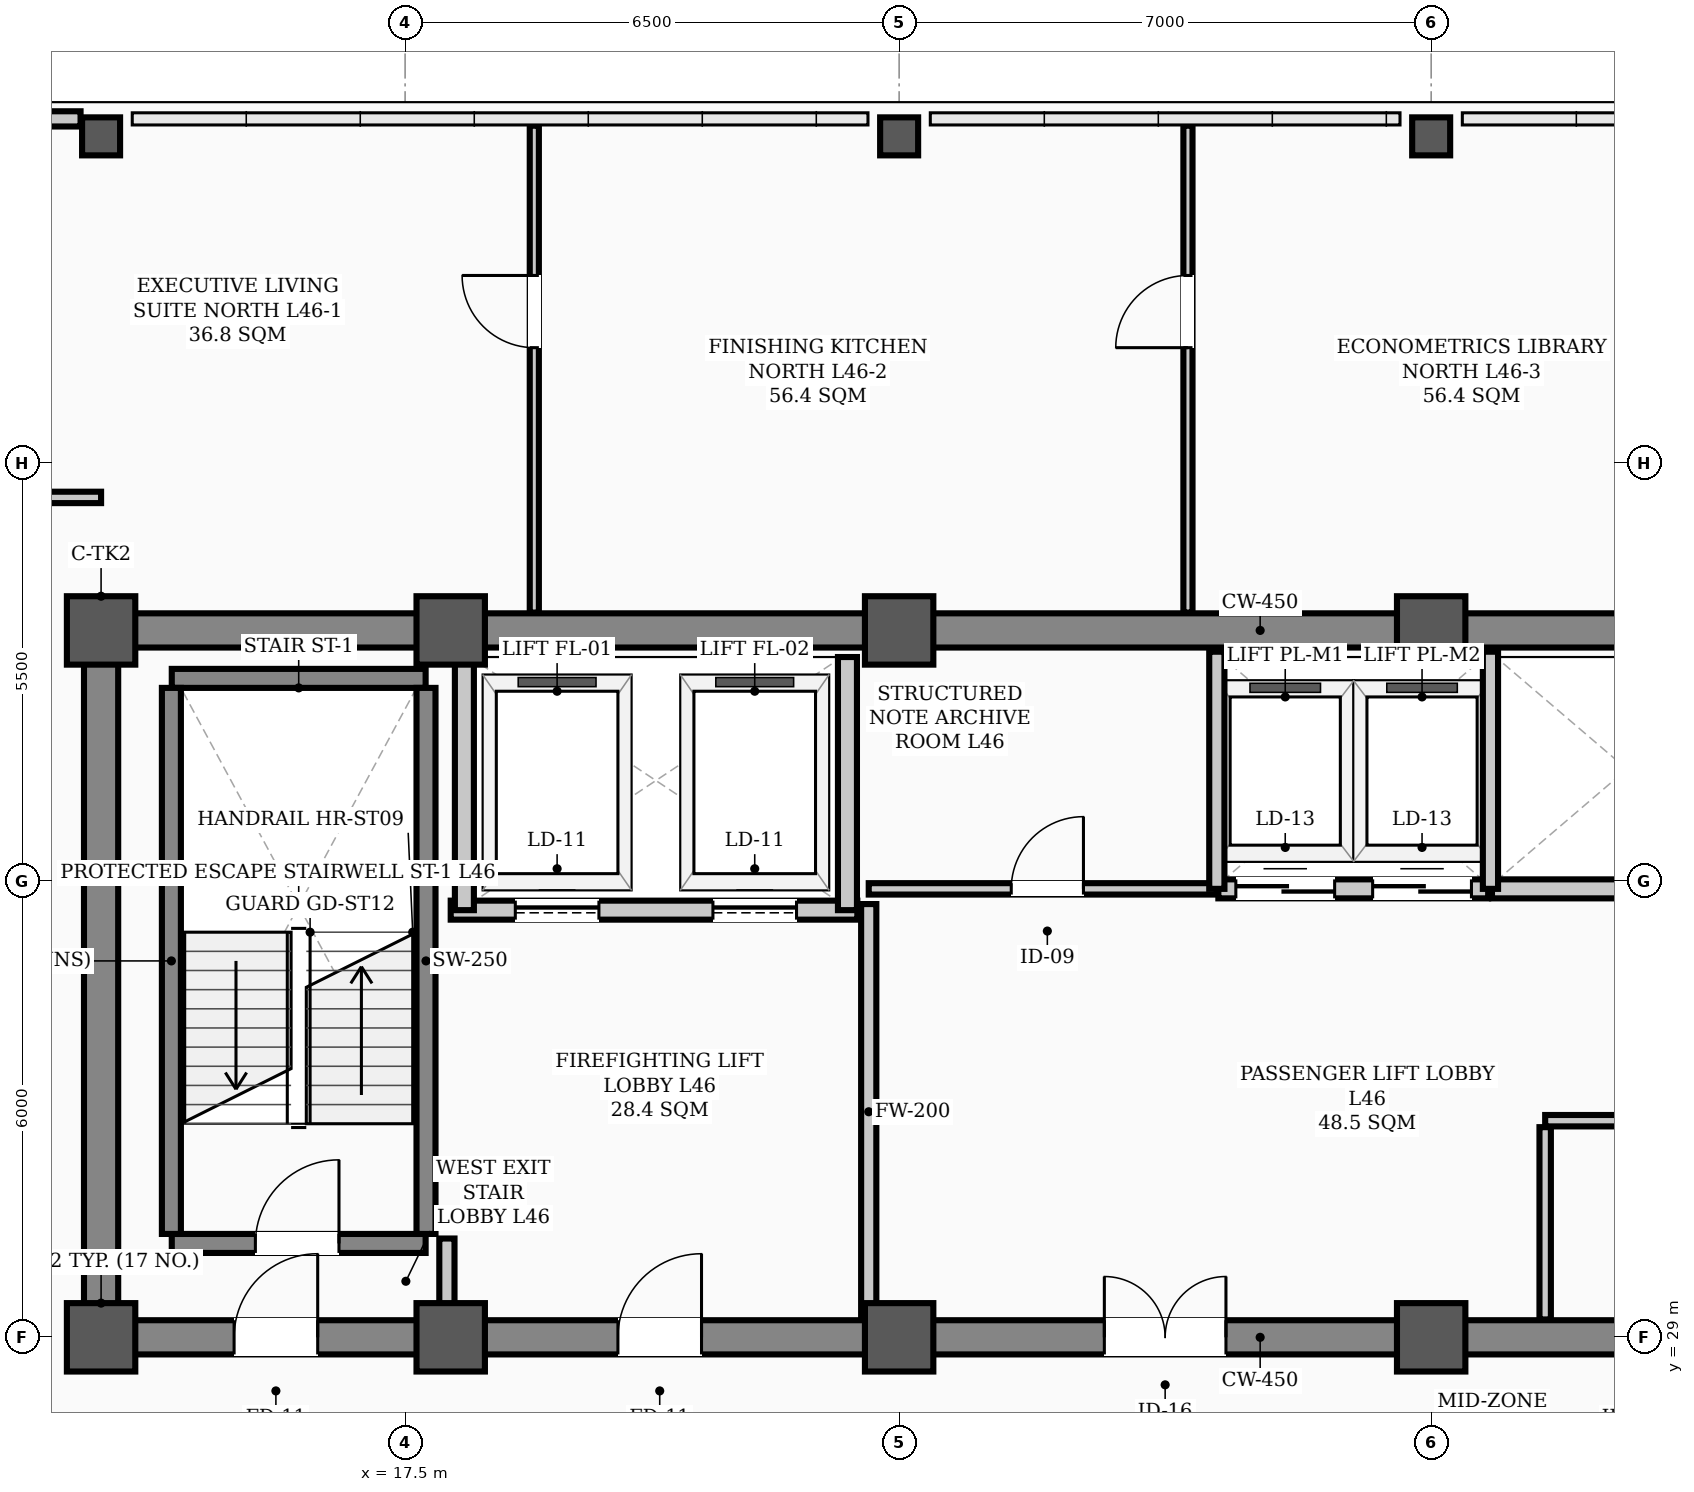
"""IFC4 building model, lengths in metres.
Left out: names, types, materials, properties, quantities, classifications, styles, units other than length and angle.
Written with IfcOpenShell. Run it as: python <this file> out.ifc"""

import sys

from ifc_helpers import new_model, si_unit, direction, frame, frame_2d, origin, origin_2d, place, context, subcontext, project, spatial, rectangle, hollow_rectangle, extrude, element, fill, save


model = new_model("IFC4")
c1 = context("Model", 3, precision=1e-05, world=origin(), true_north=direction((0.0, 1.0)))
c2 = subcontext(c1, "Body", "Model", "MODEL_VIEW")
j1 = project(units=[si_unit("LENGTHUNIT", "METRE"), si_unit("PLANEANGLEUNIT", "RADIAN")], contexts=[c1])
p1 = place(None, origin())
s1 = spatial("IfcSite", under=j1, at=p1, CompositionType="ELEMENT")
p2 = place(p1, origin())
s2 = spatial("IfcBuilding", under=s1, at=p2, CompositionType="ELEMENT")
p3 = place(p2, frame((0.0, 0.0, 185.1)))
s3 = spatial("IfcBuildingStorey", under=s2, at=p3, CompositionType="ELEMENT", Elevation=185.1)
for number, where, z_axis, x_axis in (
    (1, (13.5, 29.0, 0.0), (0.0, 0.0, 1.0), (1.0, 0.0, 0.0)),
    (2, (13.5, 38.3, 0.0), (0.0, 0.0, 1.0), (1.0, 0.0, 0.0)),
    (3, (18.1, 29.0, 0.0), (0.0, 0.0, 1.0), (1.0, 0.0, 0.0)),
    (4, (18.1, 38.3, 0.0), (0.0, 0.0, 1.0), (1.0, 0.0, 0.0)),
    (5, (24.0, 29.0, 0.0), (0.0, 0.0, 1.0), (1.0, 0.0, 0.0)),
    (6, (24.0, 38.3, 0.0), (0.0, 0.0, 1.0), (1.0, 0.0, 0.0)),
    (7, (31.0, 29.0, 0.0), (0.0, 0.0, 1.0), (1.0, 0.0, 0.0)),
    (8, (31.0, 38.3, 0.0), (0.0, 0.0, 1.0), (1.0, 0.0, 0.0)),
):
    element("IfcColumn", number, at=place(p3, frame(where, z_axis=z_axis, x_axis=x_axis)), inside=s3, PredefinedType="COLUMN", context=c2, shape_type="SweptSolid", body=[
        extrude(hollow_rectangle(XDim=0.9, YDim=0.9, WallThickness=0.035, InnerFilletRadius=0.017, OuterFilletRadius=0.052, at=origin_2d()), origin(), (0.0, 0.0, 1.0), 3.9),
    ])
for number, where, z_axis, x_axis in (
    (9, (13.5, 44.8, 0.0), (0.0, 0.0, 1.0), (1.0, 0.0, 0.0)),
    (10, (24.0, 44.8, 0.0), (0.0, 0.0, 1.0), (1.0, 0.0, 0.0)),
    (11, (31.0, 44.8, 0.0), (0.0, 0.0, 1.0), (1.0, 0.0, 0.0)),
):
    element("IfcColumn", number, at=place(p3, frame(where, z_axis=z_axis, x_axis=x_axis)), inside=s3, PredefinedType="COLUMN", context=c2, shape_type="SweptSolid", body=[
        extrude(hollow_rectangle(XDim=0.5, YDim=0.5, WallThickness=0.024, InnerFilletRadius=0.012, OuterFilletRadius=0.036, at=origin_2d()), origin(), (0.0, 0.0, 1.0), 3.9),
    ])
p4 = place(p3, frame((12.6, 45.03, 0.0), z_axis=(0.0, 0.0, 1.0), x_axis=(1.0, 0.0, 0.0)))
e12 = element("IfcWall", 12, at=p4, inside=s3, PredefinedType="PARAPET", context=c2, shape_type="SweptSolid", body=[
    extrude(rectangle(XDim=0.63, YDim=0.2, at=frame_2d((0.315, 0.0))), origin(), (0.0, 0.0, 1.0), 1.2),
])
p5 = place(p3, frame((13.5, 29.0, 0.0), z_axis=(0.0, 0.0, 1.0), x_axis=(1.0, 0.0, 0.0)))
e13 = element("IfcWall", 13, at=p5, inside=s3, PredefinedType="SHEAR", context=c2, shape_type="SweptSolid", body=[
    extrude(rectangle(XDim=30.5, YDim=0.45, at=frame_2d((15.25, 0.0))), origin(), (0.0, 0.0, 1.0), 3.72),
])
p6 = place(p5, frame((1.75, 0.0, 0.0)))
e14 = element("IfcOpeningElement", 14, at=p6, cuts=e13, PredefinedType="OPENING", context=c2, shape_type="SweptSolid", body=[
    extrude(rectangle(XDim=1.1, YDim=2.08, at=frame_2d((0.55, 1.04))), frame((0.0, 0.235, 0.0), z_axis=(0.0, -1.0, 0.0), x_axis=(1.0, 0.0, 0.0)), (0.0, 0.0, 1.0), 0.47),
])
p7 = place(p5, frame((26.7, 0.0, 0.0)))
e15 = element("IfcOpeningElement", 15, at=p7, cuts=e13, PredefinedType="OPENING", context=c2, shape_type="SweptSolid", body=[
    extrude(rectangle(XDim=1.1, YDim=2.08, at=frame_2d((0.55, 1.04))), frame((0.0, 0.235, 0.0), z_axis=(0.0, -1.0, 0.0), x_axis=(1.0, 0.0, 0.0)), (0.0, 0.0, 1.0), 0.47),
])
p8 = place(p5, frame((6.8, 0.0, 0.0)))
e16 = element("IfcOpeningElement", 16, at=p8, cuts=e13, PredefinedType="OPENING", context=c2, shape_type="SweptSolid", body=[
    extrude(rectangle(XDim=1.1, YDim=2.08, at=frame_2d((0.55, 1.04))), frame((0.0, 0.235, 0.0), z_axis=(0.0, -1.0, 0.0), x_axis=(1.0, 0.0, 0.0)), (0.0, 0.0, 1.0), 0.47),
])
p9 = place(p5, frame((13.2, 0.0, 0.0)))
e17 = element("IfcOpeningElement", 17, at=p9, cuts=e13, PredefinedType="OPENING", context=c2, shape_type="SweptSolid", body=[
    extrude(rectangle(XDim=1.6, YDim=2.08, at=frame_2d((0.8, 1.04))), frame((0.0, 0.235, 0.0), z_axis=(0.0, -1.0, 0.0), x_axis=(1.0, 0.0, 0.0)), (0.0, 0.0, 1.0), 0.47),
])
p10 = place(p5, frame((20.525, 0.0, 0.0)))
e18 = element("IfcOpeningElement", 18, at=p10, cuts=e13, PredefinedType="OPENING", context=c2, shape_type="SweptSolid", body=[
    extrude(rectangle(XDim=0.95, YDim=2.08, at=frame_2d((0.475, 1.04))), frame((0.0, 0.235, 0.0), z_axis=(0.0, -1.0, 0.0), x_axis=(1.0, 0.0, 0.0)), (0.0, 0.0, 1.0), 0.47),
])
p11 = place(p3, frame((13.5, 38.3, 0.0), z_axis=(0.0, 0.0, 1.0), x_axis=(1.0, 0.0, 0.0)))
e19 = element("IfcWall", 19, at=p11, inside=s3, PredefinedType="SHEAR", context=c2, shape_type="SweptSolid", body=[
    extrude(rectangle(XDim=30.5, YDim=0.45, at=frame_2d((15.25, 0.0))), origin(), (0.0, 0.0, 1.0), 3.72),
])
p12 = place(p3, frame((13.5, 29.35, 0.0), z_axis=(0.0, 0.0, 1.0), x_axis=(0.0, 1.0, 0.0)))
e20 = element("IfcWall", 20, at=p12, inside=s3, PredefinedType="SHEAR", context=c2, shape_type="SweptSolid", body=[
    extrude(rectangle(XDim=8.6, YDim=0.45, at=frame_2d((4.3, 0.0))), origin(), (0.0, 0.0, 1.0), 3.72),
])
p13 = place(p3, frame((14.43, 30.235, 0.0), z_axis=(0.0, 0.0, 1.0), x_axis=(1.0, 0.0, 0.0)))
e21 = element("IfcWall", 21, at=p13, inside=s3, PredefinedType="STANDARD", context=c2, shape_type="SweptSolid", body=[
    extrude(rectangle(XDim=3.34, YDim=0.25, at=frame_2d((1.67, 0.0))), origin(), (0.0, 0.0, 1.0), 3.72),
])
p14 = place(p13, frame((1.1, 0.0, 0.0)))
e22 = element("IfcOpeningElement", 22, at=p14, cuts=e21, PredefinedType="OPENING", context=c2, shape_type="SweptSolid", body=[
    extrude(rectangle(XDim=1.1, YDim=2.08, at=frame_2d((0.55, 1.04))), frame((0.0, 0.135, 0.0), z_axis=(0.0, -1.0, 0.0), x_axis=(1.0, 0.0, 0.0)), (0.0, 0.0, 1.0), 0.27),
])
p15 = place(p3, frame((14.43, 37.669, 0.0), z_axis=(0.0, 0.0, 1.0), x_axis=(1.0, 0.0, 0.0)))
e23 = element("IfcWall", 23, at=p15, inside=s3, PredefinedType="STANDARD", context=c2, shape_type="SweptSolid", body=[
    extrude(rectangle(XDim=3.34, YDim=0.25, at=frame_2d((1.67, 0.0))), origin(), (0.0, 0.0, 1.0), 3.72),
])
for number, where, z_axis, x_axis in (
    (24, (14.425, 30.36, 0.0), (0.0, 0.0, 1.0), (0.0, 1.0, 0.0)),
    (25, (17.775, 30.36, 0.0), (0.0, 0.0, 1.0), (0.0, 1.0, 0.0)),
):
    element("IfcWall", number, at=place(p3, frame(where, z_axis=z_axis, x_axis=x_axis)), inside=s3, PredefinedType="STANDARD", context=c2, shape_type="SweptSolid", body=[
        extrude(rectangle(XDim=7.184, YDim=0.25, at=frame_2d((3.592, 0.0))), origin(), (0.0, 0.0, 1.0), 3.72),
    ])
p16 = place(p3, frame((18.1, 34.62, 0.0), z_axis=(0.0, 0.0, 1.0), x_axis=(1.0, 0.0, 0.0)))
e26 = element("IfcWall", 26, at=p16, inside=s3, PredefinedType="STANDARD", context=c2, shape_type="SweptSolid", body=[
    extrude(rectangle(XDim=5.35, YDim=0.25, at=frame_2d((2.675, 0.0))), origin(), (0.0, 0.0, 1.0), 3.72),
])
p17 = place(p16, frame((0.85, 0.0, 0.0)))
e27 = element("IfcOpeningElement", 27, at=p17, cuts=e26, PredefinedType="OPENING", context=c2, shape_type="SweptSolid", body=[
    extrude(rectangle(XDim=1.1, YDim=2.08, at=frame_2d((0.55, 1.04))), frame((0.0, 0.135, 0.0), z_axis=(0.0, -1.0, 0.0), x_axis=(1.0, 0.0, 0.0)), (0.0, 0.0, 1.0), 0.27),
])
p18 = place(p16, frame((3.45, 0.0, 0.0)))
e28 = element("IfcOpeningElement", 28, at=p18, cuts=e26, PredefinedType="OPENING", context=c2, shape_type="SweptSolid", body=[
    extrude(rectangle(XDim=1.1, YDim=2.08, at=frame_2d((0.55, 1.04))), frame((0.0, 0.135, 0.0), z_axis=(0.0, -1.0, 0.0), x_axis=(1.0, 0.0, 0.0)), (0.0, 0.0, 1.0), 0.27),
])
for number, where, z_axis, x_axis in (
    (29, (18.28, 34.62, 0.0), (0.0, 0.0, 1.0), (0.0, 1.0, 0.0)),
    (30, (23.32, 34.62, 0.0), (0.0, 0.0, 1.0), (0.0, 1.0, 0.0)),
):
    element("IfcWall", number, at=place(p3, frame(where, z_axis=z_axis, x_axis=x_axis)), inside=s3, PredefinedType="STANDARD", context=c2, shape_type="SweptSolid", body=[
        extrude(rectangle(XDim=3.33, YDim=0.25, at=frame_2d((1.665, 0.0))), origin(), (0.0, 0.0, 1.0), 3.35),
    ])
p19 = place(p3, frame((28.2, 34.9, 0.0), z_axis=(0.0, 0.0, 1.0), x_axis=(1.0, 0.0, 0.0)))
e31 = element("IfcWall", 31, at=p19, inside=s3, PredefinedType="STANDARD", context=c2, shape_type="SweptSolid", body=[
    extrude(rectangle(XDim=3.55, YDim=0.25, at=frame_2d((1.775, 0.0))), origin(), (0.0, 0.0, 1.0), 3.72),
])
p20 = place(p19, frame((0.23, 0.0, 0.0)))
e32 = element("IfcOpeningElement", 32, at=p20, cuts=e31, PredefinedType="OPENING", context=c2, shape_type="SweptSolid", body=[
    extrude(rectangle(XDim=1.3, YDim=2.08, at=frame_2d((0.65, 1.04))), frame((0.0, 0.135, 0.0), z_axis=(0.0, -1.0, 0.0), x_axis=(1.0, 0.0, 0.0)), (0.0, 0.0, 1.0), 0.27),
])
p21 = place(p19, frame((2.03, 0.0, 0.0)))
e33 = element("IfcOpeningElement", 33, at=p21, cuts=e31, PredefinedType="OPENING", context=c2, shape_type="SweptSolid", body=[
    extrude(rectangle(XDim=1.3, YDim=2.08, at=frame_2d((0.65, 1.04))), frame((0.0, 0.135, 0.0), z_axis=(0.0, -1.0, 0.0), x_axis=(1.0, 0.0, 0.0)), (0.0, 0.0, 1.0), 0.27),
])
p22 = place(p3, frame((31.8, 34.9, 0.0), z_axis=(0.0, 0.0, 1.0), x_axis=(1.0, 0.0, 0.0)))
e34 = element("IfcWall", 34, at=p22, inside=s3, PredefinedType="STANDARD", context=c2, shape_type="SweptSolid", body=[
    extrude(rectangle(XDim=3.6, YDim=0.25, at=frame_2d((1.8, 0.0))), origin(), (0.0, 0.0, 1.0), 3.72),
])
p23 = place(p3, frame((23.6, 34.9, 0.0), z_axis=(0.0, 0.0, 1.0), x_axis=(1.0, 0.0, 0.0)))
e35 = element("IfcWall", 35, at=p23, inside=s3, PredefinedType="PARTITIONING", context=c2, shape_type="SweptSolid", body=[
    extrude(rectangle(XDim=4.58, YDim=0.15, at=frame_2d((2.29, 0.0))), origin(), (0.0, 0.0, 1.0), 3.72),
])
p24 = place(p23, frame((1.875, 0.0, 0.0)))
e36 = element("IfcOpeningElement", 36, at=p24, cuts=e35, PredefinedType="OPENING", context=c2, shape_type="SweptSolid", body=[
    extrude(rectangle(XDim=0.95, YDim=2.08, at=frame_2d((0.475, 1.04))), frame((0.0, 0.085, 0.0), z_axis=(0.0, -1.0, 0.0), x_axis=(1.0, 0.0, 0.0)), (0.0, 0.0, 1.0), 0.17),
])
p25 = place(p3, frame((32.5, 31.85, 0.0), z_axis=(0.0, 0.0, 1.0), x_axis=(1.0, 0.0, 0.0)))
e37 = element("IfcWall", 37, at=p25, inside=s3, PredefinedType="PARTITIONING", context=c2, shape_type="SweptSolid", body=[
    extrude(rectangle(XDim=4.1, YDim=0.15, at=frame_2d((2.05, 0.0))), origin(), (0.0, 0.0, 1.0), 3.72),
])
p26 = place(p3, frame((10.31, 40.05, 0.0), z_axis=(0.0, 0.0, 1.0), x_axis=(1.0, 0.0, 0.0)))
e38 = element("IfcWall", 38, at=p26, inside=s3, PredefinedType="PARTITIONING", context=c2, shape_type="SweptSolid", body=[
    extrude(rectangle(XDim=3.19, YDim=0.15, at=frame_2d((1.595, 0.0))), origin(), (0.0, 0.0, 1.0), 3.2),
])
p27 = place(p3, frame((18.05, 29.235, 0.0), z_axis=(0.0, 0.0, 1.0), x_axis=(0.0, 1.0, 0.0)))
e39 = element("IfcWall", 39, at=p27, inside=s3, PredefinedType="STANDARD", context=c2, shape_type="SweptSolid", body=[
    extrude(rectangle(XDim=1.065, YDim=0.2, at=frame_2d((0.532, 0.0))), origin(), (0.0, 0.0, 1.0), 3.35),
])
p28 = place(p3, frame((23.6, 29.235, 0.0), z_axis=(0.0, 0.0, 1.0), x_axis=(0.0, 1.0, 0.0)))
e40 = element("IfcWall", 40, at=p28, inside=s3, PredefinedType="STANDARD", context=c2, shape_type="SweptSolid", body=[
    extrude(rectangle(XDim=5.465, YDim=0.2, at=frame_2d((2.732, 0.0))), origin(), (0.0, 0.0, 1.0), 3.2),
])
p29 = place(p3, frame((32.5, 29.235, 0.0), z_axis=(0.0, 0.0, 1.0), x_axis=(0.0, 1.0, 0.0)))
e41 = element("IfcWall", 41, at=p29, inside=s3, PredefinedType="PARTITIONING", context=c2, shape_type="SweptSolid", body=[
    extrude(rectangle(XDim=2.53, YDim=0.15, at=frame_2d((1.265, 0.0))), origin(), (0.0, 0.0, 1.0), 3.35),
])
p30 = place(p3, frame((19.2, 38.535, 0.0), z_axis=(0.0, 0.0, 1.0), x_axis=(0.0, 1.0, 0.0)))
e42 = element("IfcWall", 42, at=p30, inside=s3, PredefinedType="PARTITIONING", context=c2, shape_type="SweptSolid", body=[
    extrude(rectangle(XDim=6.405, YDim=0.12, at=frame_2d((3.203, 0.0))), origin(), (0.0, 0.0, 1.0), 3.212),
])
p31 = place(p30, frame((3.485, 0.0, 0.0)))
e43 = element("IfcOpeningElement", 43, at=p31, cuts=e42, PredefinedType="OPENING", context=c2, shape_type="SweptSolid", body=[
    extrude(rectangle(XDim=0.95, YDim=2.08, at=frame_2d((0.475, 1.04))), frame((0.0, 0.07, 0.0), z_axis=(0.0, -1.0, 0.0), x_axis=(1.0, 0.0, 0.0)), (0.0, 0.0, 1.0), 0.14),
])
p32 = place(p3, frame((27.8, 38.535, 0.0), z_axis=(0.0, 0.0, 1.0), x_axis=(0.0, 1.0, 0.0)))
e44 = element("IfcWall", 44, at=p32, inside=s3, PredefinedType="PARTITIONING", context=c2, shape_type="SweptSolid", body=[
    extrude(rectangle(XDim=6.405, YDim=0.12, at=frame_2d((3.203, 0.0))), origin(), (0.0, 0.0, 1.0), 3.212),
])
p33 = place(p32, frame((3.485, 0.0, 0.0)))
e45 = element("IfcOpeningElement", 45, at=p33, cuts=e44, PredefinedType="OPENING", context=c2, shape_type="SweptSolid", body=[
    extrude(rectangle(XDim=0.95, YDim=2.08, at=frame_2d((0.475, 1.04))), frame((0.0, 0.07, 0.0), z_axis=(0.0, -1.0, 0.0), x_axis=(1.0, 0.0, 0.0)), (0.0, 0.0, 1.0), 0.14),
])
for number, where, z_axis, x_axis in (
    (46, (28.18, 34.9, 0.0), (0.0, 0.0, 1.0), (0.0, 1.0, 0.0)),
    (47, (31.78, 34.9, 0.0), (0.0, 0.0, 1.0), (0.0, 1.0, 0.0)),
):
    element("IfcWall", number, at=place(p3, frame(where, z_axis=z_axis, x_axis=x_axis)), inside=s3, PredefinedType="STANDARD", context=c2, shape_type="SweptSolid", body=[
        extrude(rectangle(XDim=3.12, YDim=0.2, at=frame_2d((1.56, 0.0))), origin(), (0.0, 0.0, 1.0), 3.35),
    ])
p34 = place(p14, origin())
e48 = element("IfcDoor", 48, at=p34, inside=s3, OperationType="SINGLE_SWING_RIGHT", PredefinedType="DOOR", context=c2, shape_type="SweptSolid", body=[
    extrude(rectangle(XDim=1.1, YDim=2.08, at=frame_2d((0.55, 1.04))), frame((0.0, 0.025, 0.0), z_axis=(0.0, -1.0, 0.0), x_axis=(1.0, 0.0, 0.0)), (0.0, 0.0, 1.0), 0.05),
])
fill(e22, e48)
p35 = place(p6, origin())
e49 = element("IfcDoor", 49, at=p35, inside=s3, OperationType="SINGLE_SWING_RIGHT", PredefinedType="DOOR", context=c2, shape_type="SweptSolid", body=[
    extrude(rectangle(XDim=1.1, YDim=2.08, at=frame_2d((0.55, 1.04))), frame((0.0, 0.025, 0.0), z_axis=(0.0, -1.0, 0.0), x_axis=(1.0, 0.0, 0.0)), (0.0, 0.0, 1.0), 0.05),
])
fill(e14, e49)
p36 = place(p8, origin())
e50 = element("IfcDoor", 50, at=p36, inside=s3, OperationType="SINGLE_SWING_RIGHT", PredefinedType="DOOR", context=c2, shape_type="SweptSolid", body=[
    extrude(rectangle(XDim=1.1, YDim=2.08, at=frame_2d((0.55, 1.04))), frame((0.0, 0.025, 0.0), z_axis=(0.0, -1.0, 0.0), x_axis=(1.0, 0.0, 0.0)), (0.0, 0.0, 1.0), 0.05),
])
fill(e16, e50)
p37 = place(p9, origin())
e51 = element("IfcDoor", 51, at=p37, inside=s3, OperationType="DOUBLE_DOOR_SINGLE_SWING", PredefinedType="DOOR", context=c2, shape_type="SweptSolid", body=[
    extrude(rectangle(XDim=1.6, YDim=2.08, at=frame_2d((0.8, 1.04))), frame((0.0, 0.025, 0.0), z_axis=(0.0, -1.0, 0.0), x_axis=(1.0, 0.0, 0.0)), (0.0, 0.0, 1.0), 0.05),
])
fill(e17, e51)
p38 = place(p24, origin())
e52 = element("IfcDoor", 52, at=p38, inside=s3, OperationType="SINGLE_SWING_RIGHT", PredefinedType="DOOR", context=c2, shape_type="SweptSolid", body=[
    extrude(rectangle(XDim=0.95, YDim=2.08, at=frame_2d((0.475, 1.04))), frame((0.0, 0.025, 0.0), z_axis=(0.0, -1.0, 0.0), x_axis=(1.0, 0.0, 0.0)), (0.0, 0.0, 1.0), 0.05),
])
fill(e36, e52)
p39 = place(p31, origin())
e53 = element("IfcDoor", 53, at=p39, inside=s3, OperationType="SINGLE_SWING_RIGHT", PredefinedType="DOOR", context=c2, shape_type="SweptSolid", body=[
    extrude(rectangle(XDim=0.95, YDim=2.08, at=frame_2d((0.475, 1.04))), frame((0.0, 0.025, 0.0), z_axis=(0.0, -1.0, 0.0), x_axis=(1.0, 0.0, 0.0)), (0.0, 0.0, 1.0), 0.05),
])
fill(e43, e53)
p40 = place(p33, origin())
e54 = element("IfcDoor", 54, at=p40, inside=s3, OperationType="SINGLE_SWING_LEFT", PredefinedType="DOOR", context=c2, shape_type="SweptSolid", body=[
    extrude(rectangle(XDim=0.95, YDim=2.08, at=frame_2d((0.475, 1.04))), frame((0.0, 0.025, 0.0), z_axis=(0.0, -1.0, 0.0), x_axis=(1.0, 0.0, 0.0)), (0.0, 0.0, 1.0), 0.05),
])
fill(e45, e54)
p41 = place(p17, origin())
e55 = element("IfcDoor", 55, at=p41, inside=s3, OperationType="SLIDING_TO_LEFT", PredefinedType="DOOR", context=c2, shape_type="SweptSolid", body=[
    extrude(rectangle(XDim=1.1, YDim=2.08, at=frame_2d((0.55, 1.04))), frame((0.0, 0.025, 0.0), z_axis=(0.0, -1.0, 0.0), x_axis=(1.0, 0.0, 0.0)), (0.0, 0.0, 1.0), 0.05),
])
fill(e27, e55)
p42 = place(p18, origin())
e56 = element("IfcDoor", 56, at=p42, inside=s3, OperationType="SLIDING_TO_LEFT", PredefinedType="DOOR", context=c2, shape_type="SweptSolid", body=[
    extrude(rectangle(XDim=1.1, YDim=2.08, at=frame_2d((0.55, 1.04))), frame((0.0, 0.025, 0.0), z_axis=(0.0, -1.0, 0.0), x_axis=(1.0, 0.0, 0.0)), (0.0, 0.0, 1.0), 0.05),
])
fill(e28, e56)
p43 = place(p20, origin())
e57 = element("IfcDoor", 57, at=p43, inside=s3, OperationType="DOUBLE_DOOR_SLIDING", PredefinedType="DOOR", context=c2, shape_type="SweptSolid", body=[
    extrude(rectangle(XDim=1.3, YDim=2.08, at=frame_2d((0.65, 1.04))), frame((0.0, 0.025, 0.0), z_axis=(0.0, -1.0, 0.0), x_axis=(1.0, 0.0, 0.0)), (0.0, 0.0, 1.0), 0.05),
])
fill(e32, e57)
p44 = place(p21, origin())
e58 = element("IfcDoor", 58, at=p44, inside=s3, OperationType="DOUBLE_DOOR_SLIDING", PredefinedType="DOOR", context=c2, shape_type="SweptSolid", body=[
    extrude(rectangle(XDim=1.3, YDim=2.08, at=frame_2d((0.65, 1.04))), frame((0.0, 0.025, 0.0), z_axis=(0.0, -1.0, 0.0), x_axis=(1.0, 0.0, 0.0)), (0.0, 0.0, 1.0), 0.05),
])
fill(e33, e58)
save(model, sys.argv[1])
